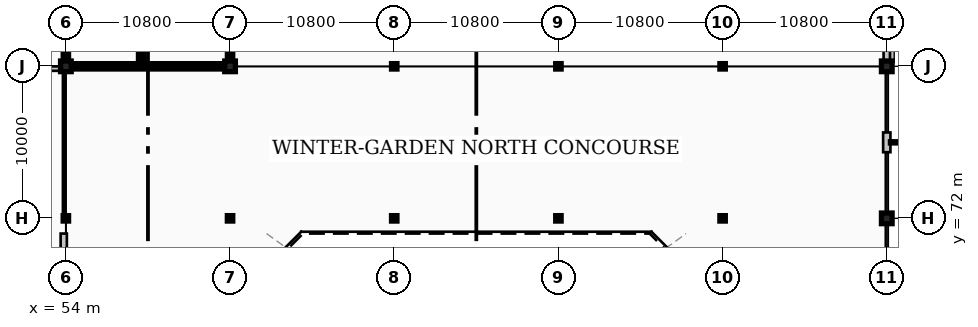
"""IFC4 building model, lengths in metres.
Left out: names, types, materials, properties, quantities, classifications, styles, units other than length and angle.
Written with IfcOpenShell. Run it as: python <this file> out.ifc"""

import sys

from ifc_helpers import new_model, si_unit, direction, frame, frame_2d, origin, origin_2d, place, context, subcontext, project, spatial, rectangle, hollow_circle, extrude, element, save


model = new_model("IFC4")
c1 = context("Model", 3, precision=1e-05, world=origin(), true_north=direction((0.0, 1.0)))
c2 = subcontext(c1, "Body", "Model", "MODEL_VIEW")
j1 = project(units=[si_unit("LENGTHUNIT", "METRE"), si_unit("PLANEANGLEUNIT", "RADIAN")], contexts=[c1])
p1 = place(None, origin())
s1 = spatial("IfcSite", under=j1, at=p1, CompositionType="ELEMENT")
p2 = place(p1, origin())
s2 = spatial("IfcBuilding", under=s1, at=p2, CompositionType="ELEMENT")
p3 = place(p2, frame((0.0, 0.0, 4.8)))
s3 = spatial("IfcBuildingStorey", under=s2, at=p3, CompositionType="ELEMENT", Elevation=4.8)
p4 = place(p3, frame((54.0, 72.0, 0.0), z_axis=(0.0, 0.0, 1.0), x_axis=(1.0, 0.0, 0.0)))
e1 = element("IfcColumn", 1, at=p4, inside=s3, PredefinedType="COLUMN", context=c2, shape_type="SweptSolid", body=[
    extrude(hollow_circle(Radius=0.178, WallThickness=0.016, at=origin_2d()), origin(), (0.0, 0.0, 1.0), 4.8),
])
p5 = place(p3, frame((54.0, 82.0, 0.0), z_axis=(0.0, 0.0, 1.0), x_axis=(1.0, 0.0, 0.0)))
e2 = element("IfcColumn", 2, at=p5, inside=s3, PredefinedType="COLUMN", context=c2, shape_type="SweptSolid", body=[
    extrude(rectangle(XDim=0.7, YDim=0.7, at=origin_2d()), origin(), (0.0, 0.0, 1.0), 4.8),
])
p6 = place(p3, frame((64.8, 72.0, 0.0), z_axis=(0.0, 0.0, 1.0), x_axis=(1.0, 0.0, 0.0)))
e3 = element("IfcColumn", 3, at=p6, inside=s3, PredefinedType="COLUMN", context=c2, shape_type="SweptSolid", body=[
    extrude(hollow_circle(Radius=0.178, WallThickness=0.016, at=origin_2d()), origin(), (0.0, 0.0, 1.0), 4.8),
])
p7 = place(p3, frame((64.8, 82.0, 0.0), z_axis=(0.0, 0.0, 1.0), x_axis=(1.0, 0.0, 0.0)))
e4 = element("IfcColumn", 4, at=p7, inside=s3, PredefinedType="COLUMN", context=c2, shape_type="SweptSolid", body=[
    extrude(rectangle(XDim=0.7, YDim=0.7, at=origin_2d()), origin(), (0.0, 0.0, 1.0), 4.8),
])
for number, where, z_axis, x_axis in (
    (5, (75.6, 72.0, 0.0), (0.0, 0.0, 1.0), (1.0, 0.0, 0.0)),
    (6, (75.6, 82.0, 0.0), (0.0, 0.0, 1.0), (1.0, 0.0, 0.0)),
    (7, (86.4, 72.0, 0.0), (0.0, 0.0, 1.0), (1.0, 0.0, 0.0)),
    (8, (86.4, 82.0, 0.0), (0.0, 0.0, 1.0), (1.0, 0.0, 0.0)),
    (9, (97.2, 72.0, 0.0), (0.0, 0.0, 1.0), (1.0, 0.0, 0.0)),
    (10, (97.2, 82.0, 0.0), (0.0, 0.0, 1.0), (1.0, 0.0, 0.0)),
):
    element("IfcColumn", number, at=place(p3, frame(where, z_axis=z_axis, x_axis=x_axis)), inside=s3, PredefinedType="COLUMN", context=c2, shape_type="SweptSolid", body=[
        extrude(hollow_circle(Radius=0.178, WallThickness=0.016, at=origin_2d()), origin(), (0.0, 0.0, 1.0), 4.8),
    ])
for number, where, z_axis, x_axis in (
    (11, (108.0, 72.0, 0.0), (0.0, 0.0, 1.0), (1.0, 0.0, 0.0)),
    (12, (108.0, 82.0, 0.0), (0.0, 0.0, 1.0), (1.0, 0.0, 0.0)),
):
    element("IfcColumn", number, at=place(p3, frame(where, z_axis=z_axis, x_axis=x_axis)), inside=s3, PredefinedType="COLUMN", context=c2, shape_type="SweptSolid", body=[
        extrude(rectangle(XDim=0.7, YDim=0.7, at=origin_2d()), origin(), (0.0, 0.0, 1.0), 4.8),
    ])
p8 = place(p3, frame((108.0, 71.63, 0.0), z_axis=(0.0, 0.0, 1.0), x_axis=(0.0, 1.0, 0.0)))
e13 = element("IfcWall", 13, at=p8, inside=s3, PredefinedType="STANDARD", context=c2, shape_type="SweptSolid", body=[
    extrude(rectangle(XDim=0.225, YDim=0.3, at=frame_2d((0.113, 0.0))), origin(), (0.0, 0.0, 1.0), 4.56),
])
p9 = place(p3, frame((108.0, 76.35, 0.0), z_axis=(0.0, 0.0, 1.0), x_axis=(0.0, 1.0, 0.0)))
e14 = element("IfcWall", 14, at=p9, inside=s3, PredefinedType="STANDARD", context=c2, shape_type="SweptSolid", body=[
    extrude(rectangle(XDim=1.3, YDim=0.48, at=frame_2d((0.65, 0.0))), origin(), (0.0, 0.0, 1.0), 4.56),
])
for number, where, z_axis, x_axis in (
    (15, (108.0, 72.145, 0.0), (0.0, 0.0, 1.0), (0.0, 1.0, 0.0)),
    (16, (108.0, 81.63, 0.0), (0.0, 0.0, 1.0), (0.0, 1.0, 0.0)),
):
    element("IfcWall", number, at=place(p3, frame(where, z_axis=z_axis, x_axis=x_axis)), inside=s3, PredefinedType="STANDARD", context=c2, shape_type="SweptSolid", body=[
        extrude(rectangle(XDim=0.225, YDim=0.3, at=frame_2d((0.113, 0.0))), origin(), (0.0, 0.0, 1.0), 4.56),
    ])
p10 = place(p3, frame((108.0, 82.145, 0.0), z_axis=(0.0, 0.0, 1.0), x_axis=(0.0, 1.0, 0.0)))
e17 = element("IfcWall", 17, at=p10, inside=s3, PredefinedType="STANDARD", context=c2, shape_type="SweptSolid", body=[
    extrude(rectangle(XDim=9.71, YDim=0.42, at=frame_2d((4.855, 0.0))), origin(), (0.0, 0.0, 1.0), 4.13),
])
p11 = place(p10, frame((4.055, 0.0, 1.2)))
e18 = element("IfcOpeningElement", 18, at=p11, cuts=e17, PredefinedType="OPENING", context=c2, shape_type="SweptSolid", body=[
    extrude(rectangle(XDim=1.6, YDim=1.8, at=frame_2d((0.8, 0.9))), frame((0.0, 0.22, 0.0), z_axis=(0.0, -1.0, 0.0), x_axis=(1.0, 0.0, 0.0)), (0.0, 0.0, 1.0), 0.44),
])
p12 = place(p3, frame((54.35, 82.0, 0.0), z_axis=(0.0, 0.0, 1.0), x_axis=(1.0, 0.0, 0.0)))
e19 = element("IfcWall", 19, at=p12, inside=s3, PredefinedType="SHEAR", context=c2, shape_type="SweptSolid", body=[
    extrude(rectangle(XDim=10.1, YDim=0.35, at=frame_2d((5.05, 0.0))), origin(), (0.0, 0.0, 1.0), 4.56),
])
p13 = place(p3, frame((54.0, 82.35, 0.0), z_axis=(0.0, 0.0, 1.0), x_axis=(0.0, 1.0, 0.0)))
e20 = element("IfcWall", 20, at=p13, inside=s3, PredefinedType="SHEAR", context=c2, shape_type="SweptSolid", body=[
    extrude(rectangle(XDim=9.3, YDim=0.35, at=frame_2d((4.65, 0.0))), origin(), (0.0, 0.0, 1.0), 4.56),
])
p14 = place(p3, frame((64.8, 82.35, 0.0), z_axis=(0.0, 0.0, 1.0), x_axis=(0.0, 1.0, 0.0)))
e21 = element("IfcWall", 21, at=p14, inside=s3, PredefinedType="SHEAR", context=c2, shape_type="SweptSolid", body=[
    extrude(rectangle(XDim=9.3, YDim=0.35, at=frame_2d((4.65, 0.0))), origin(), (0.0, 0.0, 1.0), 4.56),
])
p15 = place(p14, frame((0.83, 0.0, 0.0)))
e22 = element("IfcOpeningElement", 22, at=p15, cuts=e21, PredefinedType="OPENING", context=c2, shape_type="SweptSolid", body=[
    extrude(rectangle(XDim=1.8, YDim=2.25, at=frame_2d((0.9, 1.125))), frame((0.0, 0.185, 0.0), z_axis=(0.0, -1.0, 0.0), x_axis=(1.0, 0.0, 0.0)), (0.0, 0.0, 1.0), 0.37),
])
p16 = place(p3, frame((58.95, 82.175, 0.0), z_axis=(0.0, 0.0, 1.0), x_axis=(0.0, 1.0, 0.0)))
e23 = element("IfcWall", 23, at=p16, inside=s3, PredefinedType="SHEAR", context=c2, shape_type="SweptSolid", body=[
    extrude(rectangle(XDim=9.65, YDim=0.35, at=frame_2d((4.825, 0.0))), origin(), (0.0, 0.0, 1.0), 4.56),
])
p17 = place(p16, frame((0.9, 0.0, 0.0)))
e24 = element("IfcOpeningElement", 24, at=p17, cuts=e23, PredefinedType="OPENING", context=c2, shape_type="SweptSolid", body=[
    extrude(rectangle(XDim=1.1, YDim=2.2, at=frame_2d((0.55, 1.1))), frame((0.0, 0.185, 0.0), z_axis=(0.0, -1.0, 0.0), x_axis=(1.0, 0.0, 0.0)), (0.0, 0.0, 1.0), 0.37),
])
p18 = place(p3, frame((43.38, 81.85, 0.0), z_axis=(0.0, 0.0, 1.0), x_axis=(1.0, 0.0, 0.0)))
e25 = element("IfcWall", 25, at=p18, inside=s3, PredefinedType="PARTITIONING", context=c2, shape_type="SweptSolid", body=[
    extrude(rectangle(XDim=10.44, YDim=0.29, at=frame_2d((5.22, 0.0))), origin(), (0.0, 0.0, 1.0), 4.04),
])
p19 = place(p18, frame((4.145, 0.0, 0.0)))
e26 = element("IfcOpeningElement", 26, at=p19, cuts=e25, PredefinedType="OPENING", context=c2, shape_type="SweptSolid", body=[
    extrude(rectangle(XDim=2.15, YDim=2.6, at=frame_2d((1.075, 1.3))), frame((0.0, 0.155, 0.0), z_axis=(0.0, -1.0, 0.0), x_axis=(1.0, 0.0, 0.0)), (0.0, 0.0, 1.0), 0.31),
])
p20 = place(p3, frame((53.86, 66.2, 0.0), z_axis=(0.0, 0.0, 1.0), x_axis=(0.0, 1.0, 0.0)))
e27 = element("IfcWall", 27, at=p20, inside=s3, PredefinedType="PARTITIONING", context=c2, shape_type="SweptSolid", body=[
    extrude(rectangle(XDim=4.8, YDim=0.41, at=frame_2d((2.4, 0.0))), origin(), (0.0, 0.0, 1.0), 4.52),
])
p21 = place(p3, frame((53.86, 72.2, 0.0), z_axis=(0.0, 0.0, 1.0), x_axis=(0.0, 1.0, 0.0)))
e28 = element("IfcWall", 28, at=p21, inside=s3, PredefinedType="PARTITIONING", context=c2, shape_type="SweptSolid", body=[
    extrude(rectangle(XDim=9.62, YDim=0.11, at=frame_2d((4.81, 0.0))), origin(), (0.0, 0.0, 1.0), 4.52),
])
save(model, sys.argv[1])
